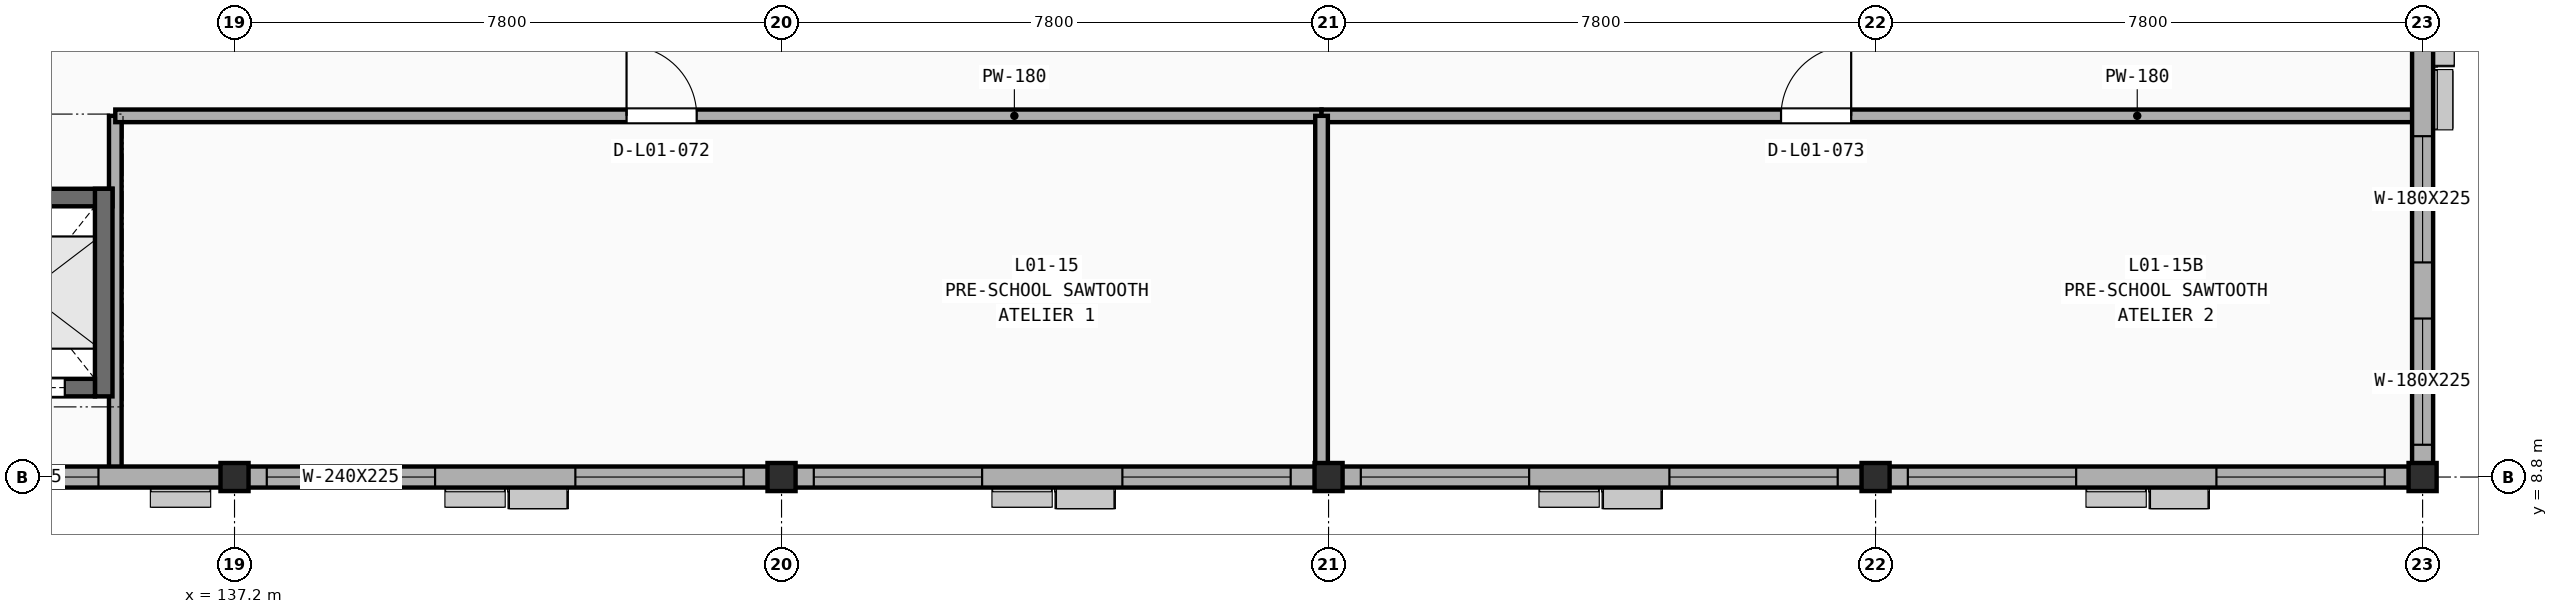
"""IFC4 building model, lengths in metres.
Left out: names, types, materials, properties, quantities, classifications, styles, units other than length and angle.
Written with IfcOpenShell. Run it as: python <this file> out.ifc"""

import sys

from ifc_helpers import new_model, si_unit, direction, frame, frame_2d, origin, origin_2d, place, context, subcontext, project, spatial, rectangle, extrude, element, fill, save


model = new_model("IFC4")
c1 = context("Model", 3, precision=1e-05, world=origin(), true_north=direction((0.0, 1.0)))
c2 = subcontext(c1, "Body", "Model", "MODEL_VIEW")
j1 = project(units=[si_unit("LENGTHUNIT", "METRE"), si_unit("PLANEANGLEUNIT", "RADIAN")], contexts=[c1])
p1 = place(None, origin())
s1 = spatial("IfcSite", under=j1, at=p1, CompositionType="ELEMENT")
p2 = place(p1, origin())
s2 = spatial("IfcBuilding", under=s1, at=p2, CompositionType="ELEMENT")
p3 = place(p2, frame((0.0, 0.0, 5.4)))
s3 = spatial("IfcBuildingStorey", under=s2, at=p3, CompositionType="ELEMENT", Elevation=5.4)
for number, where, z_axis, x_axis in (
    (1, (137.2, 8.8, 0.0), (0.0, 0.0, 1.0), (1.0, 0.0, 0.0)),
    (2, (145.0, 8.8, 0.0), (0.0, 0.0, 1.0), (1.0, 0.0, 0.0)),
    (3, (152.8, 8.8, 0.0), (0.0, 0.0, 1.0), (1.0, 0.0, 0.0)),
    (4, (160.6, 8.8, 0.0), (0.0, 0.0, 1.0), (1.0, 0.0, 0.0)),
    (5, (168.4, 8.8, 0.0), (0.0, 0.0, 1.0), (1.0, 0.0, 0.0)),
):
    element("IfcColumn", number, at=place(p3, frame(where, z_axis=z_axis, x_axis=x_axis)), inside=s3, PredefinedType="COLUMN", context=c2, shape_type="SweptSolid", body=[
        extrude(rectangle(XDim=0.4, YDim=0.4, at=origin_2d()), origin(), (0.0, 0.0, 1.0), 4.2),
    ])
p4 = place(p3, frame((135.5, 8.94, 0.0), z_axis=(0.0, 0.0, 1.0), x_axis=(0.0, 1.0, 0.0)))
e6 = element("IfcWall", 6, at=p4, inside=s3, PredefinedType="PARTITIONING", context=c2, shape_type="SweptSolid", body=[
    extrude(rectangle(XDim=5.01, YDim=0.18, at=frame_2d((2.505, 0.0))), origin(), (0.0, 0.0, 1.0), 3.67),
])
p5 = place(p3, frame((135.5, 13.95, 0.0), z_axis=(0.0, 0.0, 1.0), x_axis=(1.0, 0.0, 0.0)))
e7 = element("IfcWall", 7, at=p5, inside=s3, PredefinedType="PARTITIONING", context=c2, shape_type="SweptSolid", body=[
    extrude(rectangle(XDim=17.2, YDim=0.18, at=frame_2d((8.6, 0.0))), origin(), (0.0, 0.0, 1.0), 3.59),
])
p6 = place(p5, frame((7.29, 0.0, -0.01)))
e8 = element("IfcOpeningElement", 8, at=p6, cuts=e7, PredefinedType="OPENING", context=c2, shape_type="SweptSolid", body=[
    extrude(rectangle(XDim=1.0, YDim=2.16, at=frame_2d((0.5, 1.08))), frame((0.0, 0.1, 0.0), z_axis=(0.0, -1.0, 0.0), x_axis=(1.0, 0.0, 0.0)), (0.0, 0.0, 1.0), 0.2),
])
p7 = place(p3, frame((152.7, 13.95, 0.0), z_axis=(0.0, 0.0, 1.0), x_axis=(1.0, 0.0, 0.0)))
e9 = element("IfcWall", 9, at=p7, inside=s3, PredefinedType="PARTITIONING", context=c2, shape_type="SweptSolid", body=[
    extrude(rectangle(XDim=15.56, YDim=0.18, at=frame_2d((7.78, 0.0))), origin(), (0.0, 0.0, 1.0), 3.59),
])
p8 = place(p7, frame((6.552, 0.0, -0.01)))
e10 = element("IfcOpeningElement", 10, at=p8, cuts=e9, PredefinedType="OPENING", context=c2, shape_type="SweptSolid", body=[
    extrude(rectangle(XDim=1.0, YDim=2.16, at=frame_2d((0.5, 1.08))), frame((0.0, 0.1, 0.0), z_axis=(0.0, -1.0, 0.0), x_axis=(1.0, 0.0, 0.0)), (0.0, 0.0, 1.0), 0.2),
])
p9 = place(p3, frame((152.7, 8.94, 0.0), z_axis=(0.0, 0.0, 1.0), x_axis=(0.0, 1.0, 0.0)))
e11 = element("IfcWall", 11, at=p9, inside=s3, PredefinedType="PARTITIONING", context=c2, shape_type="SweptSolid", body=[
    extrude(rectangle(XDim=5.01, YDim=0.18, at=frame_2d((2.505, 0.0))), origin(), (0.0, 0.0, 1.0), 3.59),
])
p10 = place(p3, frame((129.4, 8.8, 0.0), z_axis=(0.0, 0.0, 1.0), x_axis=(1.0, 0.0, 0.0)))
e12 = element("IfcWall", 12, at=p10, inside=s3, PredefinedType="SOLIDWALL", context=c2, shape_type="SweptSolid", body=[
    extrude(rectangle(XDim=7.8, YDim=0.3, at=frame_2d((3.9, 0.0))), origin(), (0.0, 0.0, 1.0), 3.59),
])
p11 = place(p10, frame((0.46, 0.0, 0.9)))
e13 = element("IfcOpeningElement", 13, at=p11, cuts=e12, PredefinedType="OPENING", context=c2, shape_type="SweptSolid", body=[
    extrude(rectangle(XDim=2.4, YDim=2.25, at=frame_2d((1.2, 1.125))), frame((0.0, 0.16, 0.0), z_axis=(0.0, -1.0, 0.0), x_axis=(1.0, 0.0, 0.0)), (0.0, 0.0, 1.0), 0.32),
])
p12 = place(p10, frame((3.46, 0.0, 0.9)))
e14 = element("IfcOpeningElement", 14, at=p12, cuts=e12, PredefinedType="OPENING", context=c2, shape_type="SweptSolid", body=[
    extrude(rectangle(XDim=2.4, YDim=2.25, at=frame_2d((1.2, 1.125))), frame((0.0, 0.16, 0.0), z_axis=(0.0, -1.0, 0.0), x_axis=(1.0, 0.0, 0.0)), (0.0, 0.0, 1.0), 0.32),
])
p13 = place(p3, frame((137.2, 8.8, 0.0), z_axis=(0.0, 0.0, 1.0), x_axis=(1.0, 0.0, 0.0)))
e15 = element("IfcWall", 15, at=p13, inside=s3, PredefinedType="SOLIDWALL", context=c2, shape_type="SweptSolid", body=[
    extrude(rectangle(XDim=7.8, YDim=0.3, at=frame_2d((3.9, 0.0))), origin(), (0.0, 0.0, 1.0), 3.59),
])
p14 = place(p13, frame((0.46, 0.0, 0.9)))
e16 = element("IfcOpeningElement", 16, at=p14, cuts=e15, PredefinedType="OPENING", context=c2, shape_type="SweptSolid", body=[
    extrude(rectangle(XDim=2.4, YDim=2.25, at=frame_2d((1.2, 1.125))), frame((0.0, 0.16, 0.0), z_axis=(0.0, -1.0, 0.0), x_axis=(1.0, 0.0, 0.0)), (0.0, 0.0, 1.0), 0.32),
])
p15 = place(p13, frame((4.86, 0.0, 0.9)))
e17 = element("IfcOpeningElement", 17, at=p15, cuts=e15, PredefinedType="OPENING", context=c2, shape_type="SweptSolid", body=[
    extrude(rectangle(XDim=2.4, YDim=2.25, at=frame_2d((1.2, 1.125))), frame((0.0, 0.16, 0.0), z_axis=(0.0, -1.0, 0.0), x_axis=(1.0, 0.0, 0.0)), (0.0, 0.0, 1.0), 0.32),
])
p16 = place(p3, frame((145.0, 8.8, 0.0), z_axis=(0.0, 0.0, 1.0), x_axis=(1.0, 0.0, 0.0)))
e18 = element("IfcWall", 18, at=p16, inside=s3, PredefinedType="SOLIDWALL", context=c2, shape_type="SweptSolid", body=[
    extrude(rectangle(XDim=7.8, YDim=0.3, at=frame_2d((3.9, 0.0))), origin(), (0.0, 0.0, 1.0), 3.59),
])
p17 = place(p16, frame((0.46, 0.0, 0.9)))
e19 = element("IfcOpeningElement", 19, at=p17, cuts=e18, PredefinedType="OPENING", context=c2, shape_type="SweptSolid", body=[
    extrude(rectangle(XDim=2.4, YDim=2.25, at=frame_2d((1.2, 1.125))), frame((0.0, 0.16, 0.0), z_axis=(0.0, -1.0, 0.0), x_axis=(1.0, 0.0, 0.0)), (0.0, 0.0, 1.0), 0.32),
])
p18 = place(p16, frame((4.86, 0.0, 0.9)))
e20 = element("IfcOpeningElement", 20, at=p18, cuts=e18, PredefinedType="OPENING", context=c2, shape_type="SweptSolid", body=[
    extrude(rectangle(XDim=2.4, YDim=2.25, at=frame_2d((1.2, 1.125))), frame((0.0, 0.16, 0.0), z_axis=(0.0, -1.0, 0.0), x_axis=(1.0, 0.0, 0.0)), (0.0, 0.0, 1.0), 0.32),
])
p19 = place(p3, frame((152.8, 8.8, 0.0), z_axis=(0.0, 0.0, 1.0), x_axis=(1.0, 0.0, 0.0)))
e21 = element("IfcWall", 21, at=p19, inside=s3, PredefinedType="SOLIDWALL", context=c2, shape_type="SweptSolid", body=[
    extrude(rectangle(XDim=7.8, YDim=0.3, at=frame_2d((3.9, 0.0))), origin(), (0.0, 0.0, 1.0), 3.59),
])
p20 = place(p19, frame((0.46, 0.0, 0.9)))
e22 = element("IfcOpeningElement", 22, at=p20, cuts=e21, PredefinedType="OPENING", context=c2, shape_type="SweptSolid", body=[
    extrude(rectangle(XDim=2.4, YDim=2.25, at=frame_2d((1.2, 1.125))), frame((0.0, 0.16, 0.0), z_axis=(0.0, -1.0, 0.0), x_axis=(1.0, 0.0, 0.0)), (0.0, 0.0, 1.0), 0.32),
])
p21 = place(p19, frame((4.86, 0.0, 0.9)))
e23 = element("IfcOpeningElement", 23, at=p21, cuts=e21, PredefinedType="OPENING", context=c2, shape_type="SweptSolid", body=[
    extrude(rectangle(XDim=2.4, YDim=2.25, at=frame_2d((1.2, 1.125))), frame((0.0, 0.16, 0.0), z_axis=(0.0, -1.0, 0.0), x_axis=(1.0, 0.0, 0.0)), (0.0, 0.0, 1.0), 0.32),
])
p22 = place(p3, frame((160.6, 8.8, 0.0), z_axis=(0.0, 0.0, 1.0), x_axis=(1.0, 0.0, 0.0)))
e24 = element("IfcWall", 24, at=p22, inside=s3, PredefinedType="SOLIDWALL", context=c2, shape_type="SweptSolid", body=[
    extrude(rectangle(XDim=7.8, YDim=0.3, at=frame_2d((3.9, 0.0))), origin(), (0.0, 0.0, 1.0), 3.59),
])
p23 = place(p22, frame((0.46, 0.0, 0.9)))
e25 = element("IfcOpeningElement", 25, at=p23, cuts=e24, PredefinedType="OPENING", context=c2, shape_type="SweptSolid", body=[
    extrude(rectangle(XDim=2.4, YDim=2.25, at=frame_2d((1.2, 1.125))), frame((0.0, 0.16, 0.0), z_axis=(0.0, -1.0, 0.0), x_axis=(1.0, 0.0, 0.0)), (0.0, 0.0, 1.0), 0.32),
])
p24 = place(p22, frame((4.86, 0.0, 0.9)))
e26 = element("IfcOpeningElement", 26, at=p24, cuts=e24, PredefinedType="OPENING", context=c2, shape_type="SweptSolid", body=[
    extrude(rectangle(XDim=2.4, YDim=2.25, at=frame_2d((1.2, 1.125))), frame((0.0, 0.16, 0.0), z_axis=(0.0, -1.0, 0.0), x_axis=(1.0, 0.0, 0.0)), (0.0, 0.0, 1.0), 0.32),
])
p25 = place(p3, frame((168.4, 8.8, 0.0), z_axis=(0.0, 0.0, 1.0), x_axis=(0.0, 1.0, 0.0)))
e27 = element("IfcWall", 27, at=p25, inside=s3, PredefinedType="SOLIDWALL", context=c2, shape_type="SweptSolid", body=[
    extrude(rectangle(XDim=7.2, YDim=0.3, at=frame_2d((3.6, 0.0))), origin(), (0.0, 0.0, 1.0), 3.59),
])
p26 = place(p25, frame((0.46, 0.0, 0.9)))
e28 = element("IfcOpeningElement", 28, at=p26, cuts=e27, PredefinedType="OPENING", context=c2, shape_type="SweptSolid", body=[
    extrude(rectangle(XDim=1.8, YDim=2.25, at=frame_2d((0.9, 1.125))), frame((0.0, 0.16, 0.0), z_axis=(0.0, -1.0, 0.0), x_axis=(1.0, 0.0, 0.0)), (0.0, 0.0, 1.0), 0.32),
])
p27 = place(p25, frame((3.06, 0.0, 0.9)))
e29 = element("IfcOpeningElement", 29, at=p27, cuts=e27, PredefinedType="OPENING", context=c2, shape_type="SweptSolid", body=[
    extrude(rectangle(XDim=1.8, YDim=2.25, at=frame_2d((0.9, 1.125))), frame((0.0, 0.16, 0.0), z_axis=(0.0, -1.0, 0.0), x_axis=(1.0, 0.0, 0.0)), (0.0, 0.0, 1.0), 0.32),
])
p28 = place(p3, frame((133.25, 12.785, 0.0), z_axis=(0.0, 0.0, 1.0), x_axis=(1.0, 0.0, 0.0)))
e30 = element("IfcWall", 30, at=p28, inside=s3, PredefinedType="SHEAR", context=c2, shape_type="SweptSolid", body=[
    extrude(rectangle(XDim=2.21, YDim=0.25, at=frame_2d((1.105, 0.0))), origin(), (0.0, 0.0, 1.0), 4.2),
])
p29 = place(p3, frame((135.335, 9.95, 0.0), z_axis=(0.0, 0.0, 1.0), x_axis=(0.0, 1.0, 0.0)))
e31 = element("IfcWall", 31, at=p29, inside=s3, PredefinedType="SHEAR", context=c2, shape_type="SweptSolid", body=[
    extrude(rectangle(XDim=2.96, YDim=0.25, at=frame_2d((1.48, 0.0))), origin(), (0.0, 0.0, 1.0), 4.2),
])
p30 = place(p3, frame((133.25, 10.075, 0.0), z_axis=(0.0, 0.0, 1.0), x_axis=(1.0, 0.0, 0.0)))
e32 = element("IfcWall", 32, at=p30, inside=s3, PredefinedType="SHEAR", context=c2, shape_type="SweptSolid", body=[
    extrude(rectangle(XDim=1.96, YDim=0.25, at=frame_2d((0.98, 0.0))), origin(), (0.0, 0.0, 1.0), 4.2),
])
p31 = place(p30, frame((0.43, 0.0, -0.01)))
e33 = element("IfcOpeningElement", 33, at=p31, cuts=e32, PredefinedType="OPENING", context=c2, shape_type="SweptSolid", body=[
    extrude(rectangle(XDim=1.1, YDim=2.16, at=frame_2d((0.55, 1.08))), frame((0.0, 0.135, 0.0), z_axis=(0.0, -1.0, 0.0), x_axis=(1.0, 0.0, 0.0)), (0.0, 0.0, 1.0), 0.27),
])
p32 = place(p6, frame((1.0, 0.0, 0.01), z_axis=(0.0, 0.0, 1.0), x_axis=(-1.0, 0.0, 0.0)))
e34 = element("IfcDoor", 34, at=p32, inside=s3, OperationType="SINGLE_SWING_LEFT", PredefinedType="DOOR", context=c2, shape_type="SweptSolid", body=[
    extrude(rectangle(XDim=1.0, YDim=2.15, at=frame_2d((0.5, 1.075))), frame((0.0, 0.025, 0.0), z_axis=(0.0, -1.0, 0.0), x_axis=(1.0, 0.0, 0.0)), (0.0, 0.0, 1.0), 0.05),
])
fill(e8, e34)
p33 = place(p8, frame((0.0, 0.0, 0.01)))
e35 = element("IfcDoor", 35, at=p33, inside=s3, OperationType="SINGLE_SWING_RIGHT", PredefinedType="DOOR", context=c2, shape_type="SweptSolid", body=[
    extrude(rectangle(XDim=1.0, YDim=2.15, at=frame_2d((0.5, 1.075))), frame((0.0, 0.025, 0.0), z_axis=(0.0, -1.0, 0.0), x_axis=(1.0, 0.0, 0.0)), (0.0, 0.0, 1.0), 0.05),
])
fill(e10, e35)
p34 = place(p12, origin())
e36 = element("IfcWindow", 36, at=p34, inside=s3, PartitioningType="TRIPLE_PANEL_VERTICAL", PredefinedType="WINDOW", context=c2, shape_type="SweptSolid", body=[
    extrude(rectangle(XDim=2.4, YDim=2.25, at=frame_2d((1.2, 1.125))), frame((0.0, 0.03, 0.0), z_axis=(0.0, -1.0, 0.0), x_axis=(1.0, 0.0, 0.0)), (0.0, 0.0, 1.0), 0.06),
])
fill(e14, e36)
p35 = place(p14, origin())
e37 = element("IfcWindow", 37, at=p35, inside=s3, PartitioningType="TRIPLE_PANEL_VERTICAL", PredefinedType="WINDOW", context=c2, shape_type="SweptSolid", body=[
    extrude(rectangle(XDim=2.4, YDim=2.25, at=frame_2d((1.2, 1.125))), frame((0.0, 0.03, 0.0), z_axis=(0.0, -1.0, 0.0), x_axis=(1.0, 0.0, 0.0)), (0.0, 0.0, 1.0), 0.06),
])
fill(e16, e37)
p36 = place(p15, origin())
e38 = element("IfcWindow", 38, at=p36, inside=s3, PartitioningType="TRIPLE_PANEL_VERTICAL", PredefinedType="WINDOW", context=c2, shape_type="SweptSolid", body=[
    extrude(rectangle(XDim=2.4, YDim=2.25, at=frame_2d((1.2, 1.125))), frame((0.0, 0.03, 0.0), z_axis=(0.0, -1.0, 0.0), x_axis=(1.0, 0.0, 0.0)), (0.0, 0.0, 1.0), 0.06),
])
fill(e17, e38)
p37 = place(p17, origin())
e39 = element("IfcWindow", 39, at=p37, inside=s3, PartitioningType="TRIPLE_PANEL_VERTICAL", PredefinedType="WINDOW", context=c2, shape_type="SweptSolid", body=[
    extrude(rectangle(XDim=2.4, YDim=2.25, at=frame_2d((1.2, 1.125))), frame((0.0, 0.03, 0.0), z_axis=(0.0, -1.0, 0.0), x_axis=(1.0, 0.0, 0.0)), (0.0, 0.0, 1.0), 0.06),
])
fill(e19, e39)
p38 = place(p18, origin())
e40 = element("IfcWindow", 40, at=p38, inside=s3, PartitioningType="TRIPLE_PANEL_VERTICAL", PredefinedType="WINDOW", context=c2, shape_type="SweptSolid", body=[
    extrude(rectangle(XDim=2.4, YDim=2.25, at=frame_2d((1.2, 1.125))), frame((0.0, 0.03, 0.0), z_axis=(0.0, -1.0, 0.0), x_axis=(1.0, 0.0, 0.0)), (0.0, 0.0, 1.0), 0.06),
])
fill(e20, e40)
p39 = place(p20, origin())
e41 = element("IfcWindow", 41, at=p39, inside=s3, PartitioningType="TRIPLE_PANEL_VERTICAL", PredefinedType="WINDOW", context=c2, shape_type="SweptSolid", body=[
    extrude(rectangle(XDim=2.4, YDim=2.25, at=frame_2d((1.2, 1.125))), frame((0.0, 0.03, 0.0), z_axis=(0.0, -1.0, 0.0), x_axis=(1.0, 0.0, 0.0)), (0.0, 0.0, 1.0), 0.06),
])
fill(e22, e41)
p40 = place(p21, origin())
e42 = element("IfcWindow", 42, at=p40, inside=s3, PartitioningType="TRIPLE_PANEL_VERTICAL", PredefinedType="WINDOW", context=c2, shape_type="SweptSolid", body=[
    extrude(rectangle(XDim=2.4, YDim=2.25, at=frame_2d((1.2, 1.125))), frame((0.0, 0.03, 0.0), z_axis=(0.0, -1.0, 0.0), x_axis=(1.0, 0.0, 0.0)), (0.0, 0.0, 1.0), 0.06),
])
fill(e23, e42)
p41 = place(p23, origin())
e43 = element("IfcWindow", 43, at=p41, inside=s3, PartitioningType="TRIPLE_PANEL_VERTICAL", PredefinedType="WINDOW", context=c2, shape_type="SweptSolid", body=[
    extrude(rectangle(XDim=2.4, YDim=2.25, at=frame_2d((1.2, 1.125))), frame((0.0, 0.03, 0.0), z_axis=(0.0, -1.0, 0.0), x_axis=(1.0, 0.0, 0.0)), (0.0, 0.0, 1.0), 0.06),
])
fill(e25, e43)
p42 = place(p24, origin())
e44 = element("IfcWindow", 44, at=p42, inside=s3, PartitioningType="TRIPLE_PANEL_VERTICAL", PredefinedType="WINDOW", context=c2, shape_type="SweptSolid", body=[
    extrude(rectangle(XDim=2.4, YDim=2.25, at=frame_2d((1.2, 1.125))), frame((0.0, 0.03, 0.0), z_axis=(0.0, -1.0, 0.0), x_axis=(1.0, 0.0, 0.0)), (0.0, 0.0, 1.0), 0.06),
])
fill(e26, e44)
p43 = place(p26, origin())
e45 = element("IfcWindow", 45, at=p43, inside=s3, PartitioningType="DOUBLE_PANEL_VERTICAL", PredefinedType="WINDOW", context=c2, shape_type="SweptSolid", body=[
    extrude(rectangle(XDim=1.8, YDim=2.25, at=frame_2d((0.9, 1.125))), frame((0.0, 0.03, 0.0), z_axis=(0.0, -1.0, 0.0), x_axis=(1.0, 0.0, 0.0)), (0.0, 0.0, 1.0), 0.06),
])
fill(e28, e45)
p44 = place(p27, origin())
e46 = element("IfcWindow", 46, at=p44, inside=s3, PartitioningType="DOUBLE_PANEL_VERTICAL", PredefinedType="WINDOW", context=c2, shape_type="SweptSolid", body=[
    extrude(rectangle(XDim=1.8, YDim=2.25, at=frame_2d((0.9, 1.125))), frame((0.0, 0.03, 0.0), z_axis=(0.0, -1.0, 0.0), x_axis=(1.0, 0.0, 0.0)), (0.0, 0.0, 1.0), 0.06),
])
fill(e29, e46)
p45 = place(p31, frame((0.0, 0.0, 0.01)))
e47 = element("IfcDoor", 47, at=p45, inside=s3, OperationType="SLIDING_TO_LEFT", PredefinedType="DOOR", context=c2, shape_type="SweptSolid", body=[
    extrude(rectangle(XDim=1.1, YDim=2.15, at=frame_2d((0.55, 1.075))), frame((0.0, 0.025, 0.0), z_axis=(0.0, -1.0, 0.0), x_axis=(1.0, 0.0, 0.0)), (0.0, 0.0, 1.0), 0.05),
])
fill(e33, e47)
save(model, sys.argv[1])
